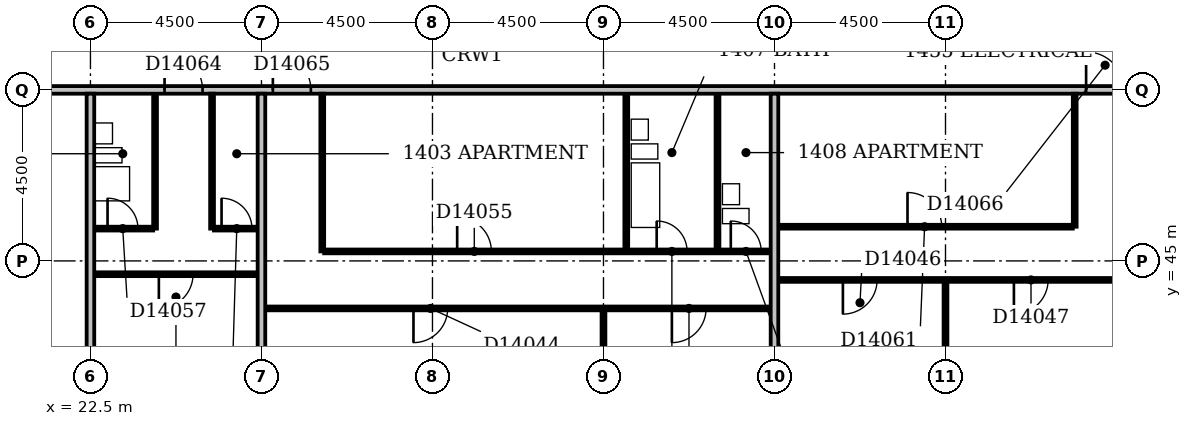
"""IFC4 building model, lengths in metres.
Left out: names, types, materials, properties, quantities, classifications, styles, units other than length and angle.
Written with IfcOpenShell. Run it as: python <this file> out.ifc"""

import sys

from ifc_helpers import new_model, si_unit, direction, frame, frame_2d, origin, place, context, subcontext, project, spatial, rectangle, extrude, element, fill, save


model = new_model("IFC4")
c1 = context("Model", 3, precision=1e-05, world=origin(), true_north=direction((0.0, 1.0)))
c2 = subcontext(c1, "Body", "Model", "MODEL_VIEW")
j1 = project(units=[si_unit("LENGTHUNIT", "METRE"), si_unit("PLANEANGLEUNIT", "RADIAN")], contexts=[c1])
p1 = place(None, origin())
s1 = spatial("IfcSite", under=j1, at=p1, CompositionType="ELEMENT")
p2 = place(p1, origin())
s2 = spatial("IfcBuilding", under=s1, at=p2, CompositionType="ELEMENT")
p3 = place(p2, frame((0.0, 0.0, 61.4)))
s3 = spatial("IfcBuildingStorey", under=s2, at=p3, CompositionType="ELEMENT", Elevation=61.4)
p4 = place(p3, frame((22.5, 36.6, 0.0), z_axis=(0.0, 0.0, 1.0), x_axis=(0.0, 1.0, 0.0)))
e1 = element("IfcWall", 1, at=p4, inside=s3, PredefinedType="PARTITIONING", context=c2, shape_type="SweptSolid", body=[
    extrude(rectangle(XDim=12.8, YDim=0.2, at=frame_2d((6.4, 0.0))), origin(), (0.0, 0.0, 1.0), 3.3),
])
p5 = place(p3, frame((27.0, 36.6, 0.0), z_axis=(0.0, 0.0, 1.0), x_axis=(0.0, 1.0, 0.0)))
e2 = element("IfcWall", 2, at=p5, inside=s3, PredefinedType="PARTITIONING", context=c2, shape_type="SweptSolid", body=[
    extrude(rectangle(XDim=12.8, YDim=0.2, at=frame_2d((6.4, 0.0))), origin(), (0.0, 0.0, 1.0), 2.6),
])
p6 = place(p3, frame((36.0, 36.6, 0.0), z_axis=(0.0, 0.0, 1.0), x_axis=(0.0, 1.0, 0.0)))
e3 = element("IfcWall", 3, at=p6, inside=s3, PredefinedType="PARTITIONING", context=c2, shape_type="SweptSolid", body=[
    extrude(rectangle(XDim=7.1, YDim=0.1, at=frame_2d((3.55, 0.0))), origin(), (0.0, 0.0, 1.0), 2.4),
])
p7 = place(p3, frame((40.5, 36.6, 0.0), z_axis=(0.0, 0.0, 1.0), x_axis=(0.0, 1.0, 0.0)))
e4 = element("IfcWall", 4, at=p7, inside=s3, PredefinedType="PARTITIONING", context=c2, shape_type="SweptSolid", body=[
    extrude(rectangle(XDim=12.8, YDim=0.2, at=frame_2d((6.4, 0.0))), origin(), (0.0, 0.0, 1.0), 3.3),
])
p8 = place(p3, frame((45.0, 36.6, 0.0), z_axis=(0.0, 0.0, 1.0), x_axis=(0.0, 1.0, 0.0)))
e5 = element("IfcWall", 5, at=p8, inside=s3, PredefinedType="PARTITIONING", context=c2, shape_type="SweptSolid", body=[
    extrude(rectangle(XDim=7.85, YDim=0.1, at=frame_2d((3.925, 0.0))), origin(), (0.0, 0.0, 1.0), 2.6),
])
p9 = place(p3, frame((27.1, 43.75, 0.0), z_axis=(0.0, 0.0, 1.0), x_axis=(1.0, 0.0, 0.0)))
e6 = element("IfcWall", 6, at=p9, inside=s3, PredefinedType="PARTITIONING", context=c2, shape_type="SweptSolid", body=[
    extrude(rectangle(XDim=13.3, YDim=0.1, at=frame_2d((6.65, 0.0))), origin(), (0.0, 0.0, 1.0), 3.3),
])
p10 = place(p9, frame((3.9, 0.0, 0.0)))
e7 = element("IfcOpeningElement", 7, at=p10, cuts=e6, PredefinedType="OPENING", context=c2, shape_type="SweptSolid", body=[
    extrude(rectangle(XDim=0.9, YDim=2.1, at=frame_2d((0.45, 1.05))), frame((0.0, 0.062, 0.0), z_axis=(0.0, -1.0, 0.0), x_axis=(1.0, 0.0, 0.0)), (0.0, 0.0, 1.0), 0.124),
])
p11 = place(p9, frame((10.7, 0.0, 0.0)))
e8 = element("IfcOpeningElement", 8, at=p11, cuts=e6, PredefinedType="OPENING", context=c2, shape_type="SweptSolid", body=[
    extrude(rectangle(XDim=0.9, YDim=2.1, at=frame_2d((0.45, 1.05))), frame((0.0, 0.062, 0.0), z_axis=(0.0, -1.0, 0.0), x_axis=(1.0, 0.0, 0.0)), (0.0, 0.0, 1.0), 0.124),
])
p12 = place(p3, frame((40.6, 44.5, 0.0), z_axis=(0.0, 0.0, 1.0), x_axis=(1.0, 0.0, 0.0)))
e9 = element("IfcWall", 9, at=p12, inside=s3, PredefinedType="PARTITIONING", context=c2, shape_type="SweptSolid", body=[
    extrude(rectangle(XDim=13.3, YDim=0.1, at=frame_2d((6.65, 0.0))), origin(), (0.0, 0.0, 1.0), 3.3),
])
p13 = place(p12, frame((1.7, 0.0, 0.0)))
e10 = element("IfcOpeningElement", 10, at=p13, cuts=e9, PredefinedType="OPENING", context=c2, shape_type="SweptSolid", body=[
    extrude(rectangle(XDim=0.9, YDim=2.1, at=frame_2d((0.45, 1.05))), frame((0.0, 0.062, 0.0), z_axis=(0.0, -1.0, 0.0), x_axis=(1.0, 0.0, 0.0)), (0.0, 0.0, 1.0), 0.124),
])
p14 = place(p12, frame((6.2, 0.0, 0.0)))
e11 = element("IfcOpeningElement", 11, at=p14, cuts=e9, PredefinedType="OPENING", context=c2, shape_type="SweptSolid", body=[
    extrude(rectangle(XDim=0.9, YDim=2.1, at=frame_2d((0.45, 1.05))), frame((0.0, 0.062, 0.0), z_axis=(0.0, -1.0, 0.0), x_axis=(1.0, 0.0, 0.0)), (0.0, 0.0, 1.0), 0.124),
])
p15 = place(p12, frame((10.7, 0.0, 0.0)))
e12 = element("IfcOpeningElement", 12, at=p15, cuts=e9, PredefinedType="OPENING", context=c2, shape_type="SweptSolid", body=[
    extrude(rectangle(XDim=0.9, YDim=2.1, at=frame_2d((0.45, 1.05))), frame((0.0, 0.062, 0.0), z_axis=(0.0, -1.0, 0.0), x_axis=(1.0, 0.0, 0.0)), (0.0, 0.0, 1.0), 0.124),
])
p16 = place(p3, frame((22.6, 44.65, 0.0), z_axis=(0.0, 0.0, 1.0), x_axis=(1.0, 0.0, 0.0)))
e13 = element("IfcWall", 13, at=p16, inside=s3, PredefinedType="PARTITIONING", context=c2, shape_type="SweptSolid", body=[
    extrude(rectangle(XDim=4.3, YDim=0.1, at=frame_2d((2.15, 0.0))), origin(), (0.0, 0.0, 1.0), 3.3),
])
p17 = place(p16, frame((1.7, 0.0, 0.0)))
e14 = element("IfcOpeningElement", 14, at=p17, cuts=e13, PredefinedType="OPENING", context=c2, shape_type="SweptSolid", body=[
    extrude(rectangle(XDim=0.9, YDim=2.1, at=frame_2d((0.45, 1.05))), frame((0.0, 0.062, 0.0), z_axis=(0.0, -1.0, 0.0), x_axis=(1.0, 0.0, 0.0)), (0.0, 0.0, 1.0), 0.124),
])
p18 = place(p3, frame((28.6, 45.25, 0.0), z_axis=(0.0, 0.0, 1.0), x_axis=(0.0, 1.0, 0.0)))
e15 = element("IfcWall", 15, at=p18, inside=s3, PredefinedType="PARTITIONING", context=c2, shape_type="SweptSolid", body=[
    extrude(rectangle(XDim=4.15, YDim=0.1, at=frame_2d((2.075, 0.0))), origin(), (0.0, 0.0, 1.0), 3.3),
])
p19 = place(p3, frame((28.65, 45.25, 0.0), z_axis=(0.0, 0.0, 1.0), x_axis=(1.0, 0.0, 0.0)))
e16 = element("IfcWall", 16, at=p19, inside=s3, PredefinedType="PARTITIONING", context=c2, shape_type="SweptSolid", body=[
    extrude(rectangle(XDim=11.75, YDim=0.1, at=frame_2d((5.875, 0.0))), origin(), (0.0, 0.0, 1.0), 3.3),
])
p20 = place(p19, frame((8.75, 0.0, 0.0)))
e17 = element("IfcOpeningElement", 17, at=p20, cuts=e16, PredefinedType="OPENING", context=c2, shape_type="SweptSolid", body=[
    extrude(rectangle(XDim=0.8, YDim=2.1, at=frame_2d((0.4, 1.05))), frame((0.0, 0.062, 0.0), z_axis=(0.0, -1.0, 0.0), x_axis=(1.0, 0.0, 0.0)), (0.0, 0.0, 1.0), 0.124),
])
p21 = place(p19, frame((3.5, 0.0, 0.0)))
e18 = element("IfcOpeningElement", 18, at=p21, cuts=e16, PredefinedType="OPENING", context=c2, shape_type="SweptSolid", body=[
    extrude(rectangle(XDim=0.9, YDim=2.1, at=frame_2d((0.45, 1.05))), frame((0.0, 0.062, 0.0), z_axis=(0.0, -1.0, 0.0), x_axis=(1.0, 0.0, 0.0)), (0.0, 0.0, 1.0), 0.124),
])
p22 = place(p19, frame((10.7, 0.0, 0.0)))
e19 = element("IfcOpeningElement", 19, at=p22, cuts=e16, PredefinedType="OPENING", context=c2, shape_type="SweptSolid", body=[
    extrude(rectangle(XDim=0.8, YDim=2.1, at=frame_2d((0.4, 1.05))), frame((0.0, 0.062, 0.0), z_axis=(0.0, -1.0, 0.0), x_axis=(1.0, 0.0, 0.0)), (0.0, 0.0, 1.0), 0.124),
])
p23 = place(p3, frame((36.6, 45.3, 0.0), z_axis=(0.0, 0.0, 1.0), x_axis=(0.0, 1.0, 0.0)))
e20 = element("IfcWall", 20, at=p23, inside=s3, PredefinedType="PLUMBINGWALL", context=c2, shape_type="SweptSolid", body=[
    extrude(rectangle(XDim=4.1, YDim=0.1, at=frame_2d((2.05, 0.0))), origin(), (0.0, 0.0, 1.0), 2.4),
])
p24 = place(p3, frame((39.0, 45.3, 0.0), z_axis=(0.0, 0.0, 1.0), x_axis=(0.0, 1.0, 0.0)))
e21 = element("IfcWall", 21, at=p24, inside=s3, PredefinedType="PLUMBINGWALL", context=c2, shape_type="SweptSolid", body=[
    extrude(rectangle(XDim=4.1, YDim=0.1, at=frame_2d((2.05, 0.0))), origin(), (0.0, 0.0, 1.0), 3.3),
])
p25 = place(p3, frame((22.6, 45.85, 0.0), z_axis=(0.0, 0.0, 1.0), x_axis=(1.0, 0.0, 0.0)))
e22 = element("IfcWall", 22, at=p25, inside=s3, PredefinedType="PARTITIONING", context=c2, shape_type="SweptSolid", body=[
    extrude(rectangle(XDim=1.55, YDim=0.1, at=frame_2d((0.775, 0.0))), origin(), (0.0, 0.0, 1.0), 3.3),
])
p26 = place(p25, frame((0.35, 0.0, 0.0)))
e23 = element("IfcOpeningElement", 23, at=p26, cuts=e22, PredefinedType="OPENING", context=c2, shape_type="SweptSolid", body=[
    extrude(rectangle(XDim=0.8, YDim=2.1, at=frame_2d((0.4, 1.05))), frame((0.0, 0.062, 0.0), z_axis=(0.0, -1.0, 0.0), x_axis=(1.0, 0.0, 0.0)), (0.0, 0.0, 1.0), 0.124),
])
p27 = place(p3, frame((24.2, 45.85, 0.0), z_axis=(0.0, 0.0, 1.0), x_axis=(0.0, 1.0, 0.0)))
e24 = element("IfcWall", 24, at=p27, inside=s3, PredefinedType="PLUMBINGWALL", context=c2, shape_type="SweptSolid", body=[
    extrude(rectangle(XDim=3.55, YDim=0.1, at=frame_2d((1.775, 0.0))), origin(), (0.0, 0.0, 1.0), 3.3),
])
p28 = place(p3, frame((25.7, 45.85, 0.0), z_axis=(0.0, 0.0, 1.0), x_axis=(0.0, 1.0, 0.0)))
e25 = element("IfcWall", 25, at=p28, inside=s3, PredefinedType="PARTITIONING", context=c2, shape_type="SweptSolid", body=[
    extrude(rectangle(XDim=3.55, YDim=0.1, at=frame_2d((1.775, 0.0))), origin(), (0.0, 0.0, 1.0), 3.3),
])
p29 = place(p3, frame((25.75, 45.85, 0.0), z_axis=(0.0, 0.0, 1.0), x_axis=(1.0, 0.0, 0.0)))
e26 = element("IfcWall", 26, at=p29, inside=s3, PredefinedType="PARTITIONING", context=c2, shape_type="SweptSolid", body=[
    extrude(rectangle(XDim=1.15, YDim=0.1, at=frame_2d((0.575, 0.0))), origin(), (0.0, 0.0, 1.0), 3.3),
])
p30 = place(p29, frame((0.2, 0.0, 0.0)))
e27 = element("IfcOpeningElement", 27, at=p30, cuts=e26, PredefinedType="OPENING", context=c2, shape_type="SweptSolid", body=[
    extrude(rectangle(XDim=0.8, YDim=2.1, at=frame_2d((0.4, 1.05))), frame((0.0, 0.062, 0.0), z_axis=(0.0, -1.0, 0.0), x_axis=(1.0, 0.0, 0.0)), (0.0, 0.0, 1.0), 0.124),
])
p31 = place(p3, frame((40.6, 45.9, 0.0), z_axis=(0.0, 0.0, 1.0), x_axis=(1.0, 0.0, 0.0)))
e28 = element("IfcWall", 28, at=p31, inside=s3, PredefinedType="PARTITIONING", context=c2, shape_type="SweptSolid", body=[
    extrude(rectangle(XDim=7.75, YDim=0.1, at=frame_2d((3.875, 0.0))), origin(), (0.0, 0.0, 1.0), 3.3),
])
p32 = place(p31, frame((3.4, 0.0, 0.0)))
e29 = element("IfcOpeningElement", 29, at=p32, cuts=e28, PredefinedType="OPENING", context=c2, shape_type="SweptSolid", body=[
    extrude(rectangle(XDim=0.9, YDim=2.1, at=frame_2d((0.45, 1.05))), frame((0.0, 0.062, 0.0), z_axis=(0.0, -1.0, 0.0), x_axis=(1.0, 0.0, 0.0)), (0.0, 0.0, 1.0), 0.124),
])
p33 = place(p3, frame((48.4, 45.9, 0.0), z_axis=(0.0, 0.0, 1.0), x_axis=(0.0, 1.0, 0.0)))
e30 = element("IfcWall", 30, at=p33, inside=s3, PredefinedType="PARTITIONING", context=c2, shape_type="SweptSolid", body=[
    extrude(rectangle(XDim=3.5, YDim=0.1, at=frame_2d((1.75, 0.0))), origin(), (0.0, 0.0, 1.0), 3.3),
])
p34 = place(p3, frame((9.1, 49.5, 0.0), z_axis=(0.0, 0.0, 1.0), x_axis=(1.0, 0.0, 0.0)))
e31 = element("IfcWall", 31, at=p34, inside=s3, PredefinedType="PARTITIONING", context=c2, shape_type="SweptSolid", body=[
    extrude(rectangle(XDim=57.8, YDim=0.2, at=frame_2d((28.9, 0.0))), origin(), (0.0, 0.0, 1.0), 3.3),
])
p35 = place(p34, frame((15.35, 0.0, 0.0)))
e32 = element("IfcOpeningElement", 32, at=p35, cuts=e31, PredefinedType="OPENING", context=c2, shape_type="SweptSolid", body=[
    extrude(rectangle(XDim=1.0, YDim=2.1, at=frame_2d((0.5, 1.05))), frame((0.0, 0.112, 0.0), z_axis=(0.0, -1.0, 0.0), x_axis=(1.0, 0.0, 0.0)), (0.0, 0.0, 1.0), 0.224),
])
p36 = place(p34, frame((18.2, 0.0, 0.0)))
e33 = element("IfcOpeningElement", 33, at=p36, cuts=e31, PredefinedType="OPENING", context=c2, shape_type="SweptSolid", body=[
    extrude(rectangle(XDim=1.0, YDim=2.1, at=frame_2d((0.5, 1.05))), frame((0.0, 0.112, 0.0), z_axis=(0.0, -1.0, 0.0), x_axis=(1.0, 0.0, 0.0)), (0.0, 0.0, 1.0), 0.224),
])
p37 = place(p34, frame((39.6, 0.0, 0.0)))
e34 = element("IfcOpeningElement", 34, at=p37, cuts=e31, PredefinedType="OPENING", context=c2, shape_type="SweptSolid", body=[
    extrude(rectangle(XDim=1.0, YDim=2.1, at=frame_2d((0.5, 1.05))), frame((0.0, 0.112, 0.0), z_axis=(0.0, -1.0, 0.0), x_axis=(1.0, 0.0, 0.0)), (0.0, 0.0, 1.0), 0.224),
])
p38 = place(p34, frame((45.2, 0.0, 0.0)))
e35 = element("IfcOpeningElement", 35, at=p38, cuts=e31, PredefinedType="OPENING", context=c2, shape_type="SweptSolid", body=[
    extrude(rectangle(XDim=1.0, YDim=2.1, at=frame_2d((0.5, 1.05))), frame((0.0, 0.112, 0.0), z_axis=(0.0, -1.0, 0.0), x_axis=(1.0, 0.0, 0.0)), (0.0, 0.0, 1.0), 0.224),
])
p39 = place(p34, frame((54.15, 0.0, 0.0)))
e36 = element("IfcOpeningElement", 36, at=p39, cuts=e31, PredefinedType="OPENING", context=c2, shape_type="SweptSolid", body=[
    extrude(rectangle(XDim=1.0, YDim=2.1, at=frame_2d((0.5, 1.05))), frame((0.0, 0.112, 0.0), z_axis=(0.0, -1.0, 0.0), x_axis=(1.0, 0.0, 0.0)), (0.0, 0.0, 1.0), 0.224),
])
p40 = place(p34, frame((6.15, 0.0, 0.0)))
e37 = element("IfcOpeningElement", 37, at=p40, cuts=e31, PredefinedType="OPENING", context=c2, shape_type="SweptSolid", body=[
    extrude(rectangle(XDim=0.9, YDim=2.1, at=frame_2d((0.45, 1.05))), frame((0.0, 0.112, 0.0), z_axis=(0.0, -1.0, 0.0), x_axis=(1.0, 0.0, 0.0)), (0.0, 0.0, 1.0), 0.224),
])
p41 = place(p10, frame((0.9, 0.0, 0.0), z_axis=(0.0, 0.0, 1.0), x_axis=(-1.0, 0.0, 0.0)))
e38 = element("IfcDoor", 38, at=p41, inside=s3, OperationType="SINGLE_SWING_RIGHT", PredefinedType="DOOR", context=c2, shape_type="SweptSolid", body=[
    extrude(rectangle(XDim=0.9, YDim=2.1, at=frame_2d((0.45, 1.05))), frame((0.0, 0.025, 0.0), z_axis=(0.0, -1.0, 0.0), x_axis=(1.0, 0.0, 0.0)), (0.0, 0.0, 1.0), 0.05),
])
fill(e7, e38)
p42 = place(p11, frame((0.9, 0.0, 0.0), z_axis=(0.0, 0.0, 1.0), x_axis=(-1.0, 0.0, 0.0)))
e39 = element("IfcDoor", 39, at=p42, inside=s3, OperationType="SINGLE_SWING_RIGHT", PredefinedType="DOOR", context=c2, shape_type="SweptSolid", body=[
    extrude(rectangle(XDim=0.9, YDim=2.1, at=frame_2d((0.45, 1.05))), frame((0.0, 0.025, 0.0), z_axis=(0.0, -1.0, 0.0), x_axis=(1.0, 0.0, 0.0)), (0.0, 0.0, 1.0), 0.05),
])
fill(e8, e39)
p43 = place(p13, frame((0.9, 0.0, 0.0), z_axis=(0.0, 0.0, 1.0), x_axis=(-1.0, 0.0, 0.0)))
e40 = element("IfcDoor", 40, at=p43, inside=s3, OperationType="SINGLE_SWING_RIGHT", PredefinedType="DOOR", context=c2, shape_type="SweptSolid", body=[
    extrude(rectangle(XDim=0.9, YDim=2.1, at=frame_2d((0.45, 1.05))), frame((0.0, 0.025, 0.0), z_axis=(0.0, -1.0, 0.0), x_axis=(1.0, 0.0, 0.0)), (0.0, 0.0, 1.0), 0.05),
])
fill(e10, e40)
p44 = place(p14, frame((0.9, 0.0, 0.0), z_axis=(0.0, 0.0, 1.0), x_axis=(-1.0, 0.0, 0.0)))
e41 = element("IfcDoor", 41, at=p44, inside=s3, OperationType="SINGLE_SWING_RIGHT", PredefinedType="DOOR", context=c2, shape_type="SweptSolid", body=[
    extrude(rectangle(XDim=0.9, YDim=2.1, at=frame_2d((0.45, 1.05))), frame((0.0, 0.025, 0.0), z_axis=(0.0, -1.0, 0.0), x_axis=(1.0, 0.0, 0.0)), (0.0, 0.0, 1.0), 0.05),
])
fill(e11, e41)
p45 = place(p17, frame((0.9, 0.0, 0.0), z_axis=(0.0, 0.0, 1.0), x_axis=(-1.0, 0.0, 0.0)))
e42 = element("IfcDoor", 42, at=p45, inside=s3, OperationType="SINGLE_SWING_RIGHT", PredefinedType="DOOR", context=c2, shape_type="SweptSolid", body=[
    extrude(rectangle(XDim=0.9, YDim=2.1, at=frame_2d((0.45, 1.05))), frame((0.0, 0.025, 0.0), z_axis=(0.0, -1.0, 0.0), x_axis=(1.0, 0.0, 0.0)), (0.0, 0.0, 1.0), 0.05),
])
fill(e14, e42)
p46 = place(p20, origin())
e43 = element("IfcDoor", 43, at=p46, inside=s3, OperationType="SINGLE_SWING_LEFT", PredefinedType="DOOR", context=c2, shape_type="SweptSolid", body=[
    extrude(rectangle(XDim=0.8, YDim=2.1, at=frame_2d((0.4, 1.05))), frame((0.0, 0.025, 0.0), z_axis=(0.0, -1.0, 0.0), x_axis=(1.0, 0.0, 0.0)), (0.0, 0.0, 1.0), 0.05),
])
fill(e17, e43)
p47 = place(p21, origin())
e44 = element("IfcDoor", 44, at=p47, inside=s3, OperationType="SINGLE_SWING_LEFT", PredefinedType="DOOR", context=c2, shape_type="SweptSolid", body=[
    extrude(rectangle(XDim=0.9, YDim=2.1, at=frame_2d((0.45, 1.05))), frame((0.0, 0.025, 0.0), z_axis=(0.0, -1.0, 0.0), x_axis=(1.0, 0.0, 0.0)), (0.0, 0.0, 1.0), 0.05),
])
fill(e18, e44)
p48 = place(p22, origin())
e45 = element("IfcDoor", 45, at=p48, inside=s3, OperationType="SINGLE_SWING_LEFT", PredefinedType="DOOR", context=c2, shape_type="SweptSolid", body=[
    extrude(rectangle(XDim=0.8, YDim=2.1, at=frame_2d((0.4, 1.05))), frame((0.0, 0.025, 0.0), z_axis=(0.0, -1.0, 0.0), x_axis=(1.0, 0.0, 0.0)), (0.0, 0.0, 1.0), 0.05),
])
fill(e19, e45)
p49 = place(p26, origin())
e46 = element("IfcDoor", 46, at=p49, inside=s3, OperationType="SINGLE_SWING_LEFT", PredefinedType="DOOR", context=c2, shape_type="SweptSolid", body=[
    extrude(rectangle(XDim=0.8, YDim=2.1, at=frame_2d((0.4, 1.05))), frame((0.0, 0.025, 0.0), z_axis=(0.0, -1.0, 0.0), x_axis=(1.0, 0.0, 0.0)), (0.0, 0.0, 1.0), 0.05),
])
fill(e23, e46)
p50 = place(p30, origin())
e47 = element("IfcDoor", 47, at=p50, inside=s3, OperationType="SINGLE_SWING_LEFT", PredefinedType="DOOR", context=c2, shape_type="SweptSolid", body=[
    extrude(rectangle(XDim=0.8, YDim=2.1, at=frame_2d((0.4, 1.05))), frame((0.0, 0.025, 0.0), z_axis=(0.0, -1.0, 0.0), x_axis=(1.0, 0.0, 0.0)), (0.0, 0.0, 1.0), 0.05),
])
fill(e27, e47)
p51 = place(p32, origin())
e48 = element("IfcDoor", 48, at=p51, inside=s3, OperationType="SINGLE_SWING_LEFT", PredefinedType="DOOR", context=c2, shape_type="SweptSolid", body=[
    extrude(rectangle(XDim=0.9, YDim=2.1, at=frame_2d((0.45, 1.05))), frame((0.0, 0.025, 0.0), z_axis=(0.0, -1.0, 0.0), x_axis=(1.0, 0.0, 0.0)), (0.0, 0.0, 1.0), 0.05),
])
fill(e29, e48)
p52 = place(p35, origin())
e49 = element("IfcDoor", 49, at=p52, inside=s3, OperationType="SINGLE_SWING_LEFT", PredefinedType="DOOR", context=c2, shape_type="SweptSolid", body=[
    extrude(rectangle(XDim=1.0, YDim=2.1, at=frame_2d((0.5, 1.05))), frame((0.0, 0.025, 0.0), z_axis=(0.0, -1.0, 0.0), x_axis=(1.0, 0.0, 0.0)), (0.0, 0.0, 1.0), 0.05),
])
fill(e32, e49)
p53 = place(p36, origin())
e50 = element("IfcDoor", 50, at=p53, inside=s3, OperationType="SINGLE_SWING_LEFT", PredefinedType="DOOR", context=c2, shape_type="SweptSolid", body=[
    extrude(rectangle(XDim=1.0, YDim=2.1, at=frame_2d((0.5, 1.05))), frame((0.0, 0.025, 0.0), z_axis=(0.0, -1.0, 0.0), x_axis=(1.0, 0.0, 0.0)), (0.0, 0.0, 1.0), 0.05),
])
fill(e33, e50)
p54 = place(p37, origin())
e51 = element("IfcDoor", 51, at=p54, inside=s3, OperationType="SINGLE_SWING_LEFT", PredefinedType="DOOR", context=c2, shape_type="SweptSolid", body=[
    extrude(rectangle(XDim=1.0, YDim=2.1, at=frame_2d((0.5, 1.05))), frame((0.0, 0.025, 0.0), z_axis=(0.0, -1.0, 0.0), x_axis=(1.0, 0.0, 0.0)), (0.0, 0.0, 1.0), 0.05),
])
fill(e34, e51)
save(model, sys.argv[1])
